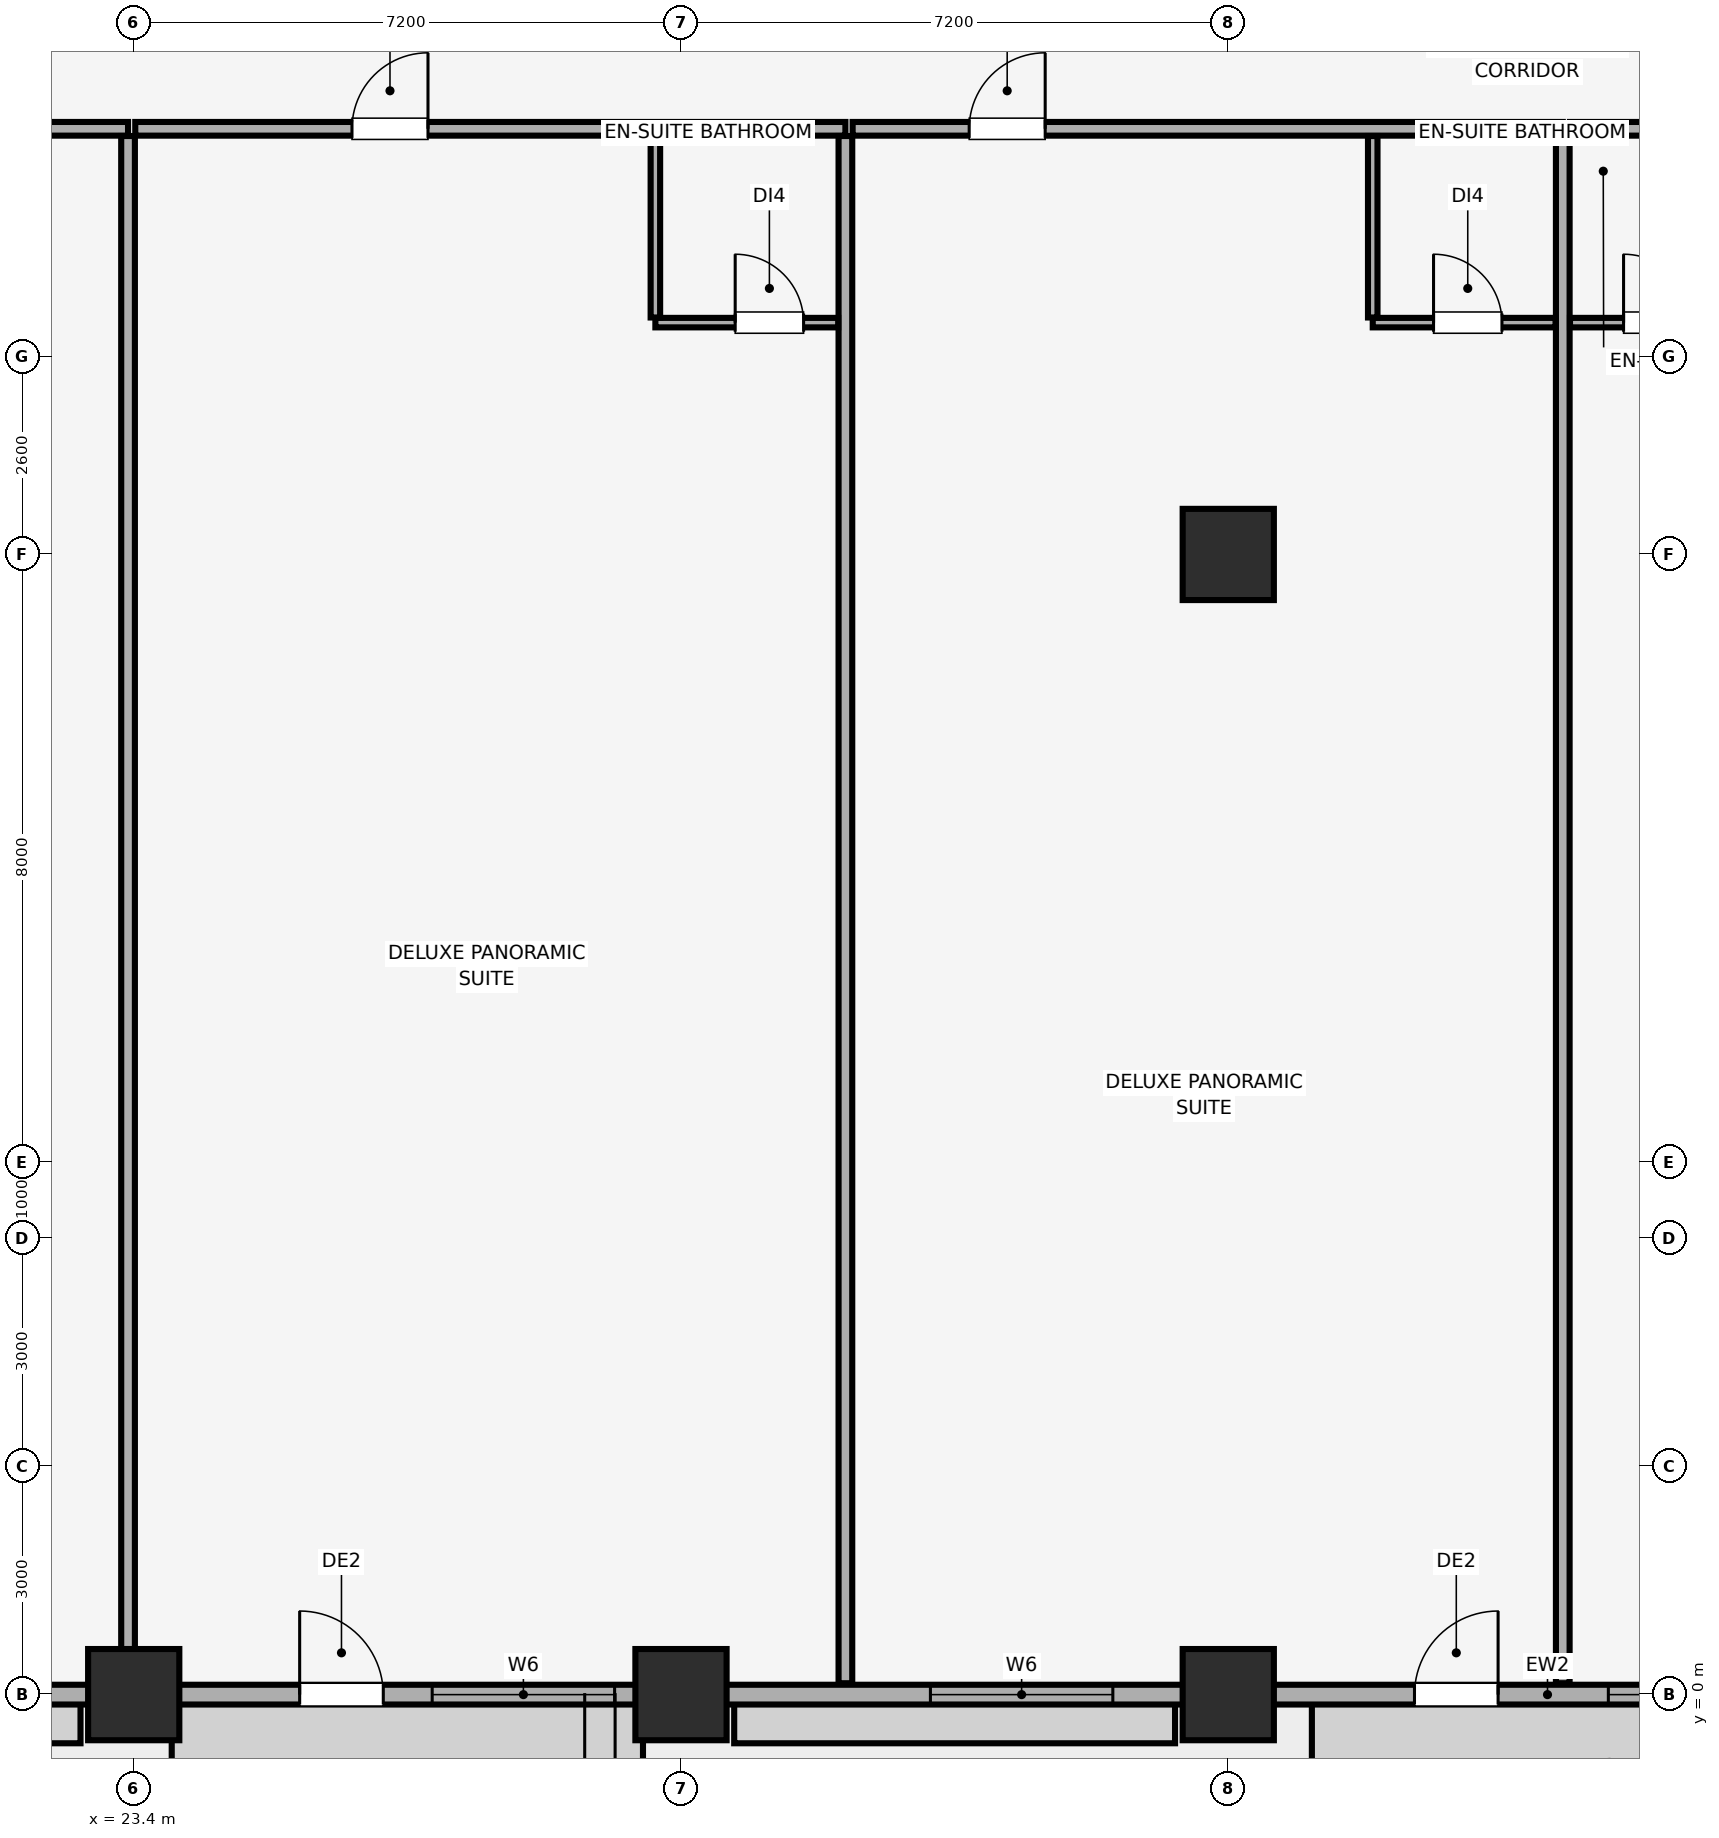
"""IFC4 building model, lengths in metres.
Left out: names, types, materials, properties, quantities, classifications, styles, units other than length and angle.
Written with IfcOpenShell. Run it as: python <this file> out.ifc"""

import sys

from ifc_helpers import new_model, si_unit, direction, frame, frame_2d, origin, origin_2d, place, context, subcontext, project, spatial, rectangle, extrude, element, fill, save


model = new_model("IFC4")
c1 = context("Model", 3, precision=1e-05, world=origin(), true_north=direction((0.0, 1.0)))
c2 = subcontext(c1, "Body", "Model", "MODEL_VIEW")
j1 = project(units=[si_unit("LENGTHUNIT", "METRE"), si_unit("PLANEANGLEUNIT", "RADIAN")], contexts=[c1])
p1 = place(None, origin())
s1 = spatial("IfcSite", under=j1, at=p1, CompositionType="ELEMENT")
p2 = place(p1, origin())
s2 = spatial("IfcBuilding", under=s1, at=p2, CompositionType="ELEMENT")
p3 = place(p2, frame((0.0, 0.0, 93.05)))
s3 = spatial("IfcBuildingStorey", under=s2, at=p3, CompositionType="ELEMENT", Elevation=93.05)
for number, where, z_axis, x_axis in (
    (1, (23.4, 0.0, 0.0), (0.0, 0.0, 1.0), (1.0, 0.0, 0.0)),
    (2, (30.6, 0.0, 0.0), (0.0, 0.0, 1.0), (1.0, 0.0, 0.0)),
    (3, (37.8, 0.0, 0.0), (0.0, 0.0, 1.0), (1.0, 0.0, 0.0)),
    (4, (37.8, 15.0, 0.0), (0.0, 0.0, 1.0), (1.0, 0.0, 0.0)),
):
    element("IfcColumn", number, at=place(p3, frame(where, z_axis=z_axis, x_axis=x_axis)), inside=s3, PredefinedType="COLUMN", context=c2, shape_type="SweptSolid", body=[
        extrude(rectangle(XDim=1.2, YDim=1.2, at=origin_2d()), origin(), (0.0, 0.0, 1.0), 3.51),
    ])
p4 = place(p3, frame((4.2, 0.0, 0.0), z_axis=(0.0, 0.0, 1.0), x_axis=(1.0, 0.0, 0.0)))
e5 = element("IfcWall", 5, at=p4, inside=s3, PredefinedType="SOLIDWALL", context=c2, shape_type="SweptSolid", body=[
    extrude(rectangle(XDim=75.6, YDim=0.26, at=frame_2d((37.8, 0.0))), origin(), (0.0, 0.0, 1.0), 2.56),
])
p5 = place(p4, frame((21.383, 0.0, 0.0)))
e6 = element("IfcOpeningElement", 6, at=p5, cuts=e5, PredefinedType="OPENING", context=c2, shape_type="SweptSolid", body=[
    extrude(rectangle(XDim=1.1, YDim=2.15, at=frame_2d((0.55, 1.075))), frame((0.0, 0.14, 0.0), z_axis=(0.0, -1.0, 0.0), x_axis=(1.0, 0.0, 0.0)), (0.0, 0.0, 1.0), 0.28),
])
p6 = place(p4, frame((36.05, 0.0, 0.0)))
e7 = element("IfcOpeningElement", 7, at=p6, cuts=e5, PredefinedType="OPENING", context=c2, shape_type="SweptSolid", body=[
    extrude(rectangle(XDim=1.1, YDim=2.15, at=frame_2d((0.55, 1.075))), frame((0.0, 0.14, 0.0), z_axis=(0.0, -1.0, 0.0), x_axis=(1.0, 0.0, 0.0)), (0.0, 0.0, 1.0), 0.28),
])
p7 = place(p4, frame((53.117, 0.0, 0.0)))
e8 = element("IfcOpeningElement", 8, at=p7, cuts=e5, PredefinedType="OPENING", context=c2, shape_type="SweptSolid", body=[
    extrude(rectangle(XDim=1.1, YDim=2.15, at=frame_2d((0.55, 1.075))), frame((0.0, 0.14, 0.0), z_axis=(0.0, -1.0, 0.0), x_axis=(1.0, 0.0, 0.0)), (0.0, 0.0, 1.0), 0.28),
])
p8 = place(p4, frame((1.035, 0.0, 0.85)))
e9 = element("IfcOpeningElement", 9, at=p8, cuts=e5, PredefinedType="OPENING", context=c2, shape_type="SweptSolid", body=[
    extrude(rectangle(XDim=2.4, YDim=1.5, at=frame_2d((1.2, 0.75))), frame((0.0, 0.14, 0.0), z_axis=(0.0, -1.0, 0.0), x_axis=(1.0, 0.0, 0.0)), (0.0, 0.0, 1.0), 0.28),
])
p9 = place(p4, frame((6.244, 0.0, 0.85)))
e10 = element("IfcOpeningElement", 10, at=p9, cuts=e5, PredefinedType="OPENING", context=c2, shape_type="SweptSolid", body=[
    extrude(rectangle(XDim=2.4, YDim=1.5, at=frame_2d((1.2, 0.75))), frame((0.0, 0.14, 0.0), z_axis=(0.0, -1.0, 0.0), x_axis=(1.0, 0.0, 0.0)), (0.0, 0.0, 1.0), 0.28),
])
p10 = place(p4, frame((14.4, 0.0, 0.85)))
e11 = element("IfcOpeningElement", 11, at=p10, cuts=e5, PredefinedType="OPENING", context=c2, shape_type="SweptSolid", body=[
    extrude(rectangle(XDim=2.4, YDim=1.5, at=frame_2d((1.2, 0.75))), frame((0.0, 0.14, 0.0), z_axis=(0.0, -1.0, 0.0), x_axis=(1.0, 0.0, 0.0)), (0.0, 0.0, 1.0), 0.28),
])
p11 = place(p4, frame((23.127, 0.0, 0.85)))
e12 = element("IfcOpeningElement", 12, at=p11, cuts=e5, PredefinedType="OPENING", context=c2, shape_type="SweptSolid", body=[
    extrude(rectangle(XDim=2.4, YDim=1.5, at=frame_2d((1.2, 0.75))), frame((0.0, 0.14, 0.0), z_axis=(0.0, -1.0, 0.0), x_axis=(1.0, 0.0, 0.0)), (0.0, 0.0, 1.0), 0.28),
])
p12 = place(p4, frame((29.681, 0.0, 0.85)))
e13 = element("IfcOpeningElement", 13, at=p12, cuts=e5, PredefinedType="OPENING", context=c2, shape_type="SweptSolid", body=[
    extrude(rectangle(XDim=2.4, YDim=1.5, at=frame_2d((1.2, 0.75))), frame((0.0, 0.14, 0.0), z_axis=(0.0, -1.0, 0.0), x_axis=(1.0, 0.0, 0.0)), (0.0, 0.0, 1.0), 0.28),
])
p13 = place(p4, frame((38.601, 0.0, 0.85)))
e14 = element("IfcOpeningElement", 14, at=p13, cuts=e5, PredefinedType="OPENING", context=c2, shape_type="SweptSolid", body=[
    extrude(rectangle(XDim=2.4, YDim=1.5, at=frame_2d((1.2, 0.75))), frame((0.0, 0.14, 0.0), z_axis=(0.0, -1.0, 0.0), x_axis=(1.0, 0.0, 0.0)), (0.0, 0.0, 1.0), 0.28),
])
p14 = place(p4, frame((43.719, 0.0, 0.85)))
e15 = element("IfcOpeningElement", 15, at=p14, cuts=e5, PredefinedType="OPENING", context=c2, shape_type="SweptSolid", body=[
    extrude(rectangle(XDim=2.4, YDim=1.5, at=frame_2d((1.2, 0.75))), frame((0.0, 0.14, 0.0), z_axis=(0.0, -1.0, 0.0), x_axis=(1.0, 0.0, 0.0)), (0.0, 0.0, 1.0), 0.28),
])
p15 = place(p4, frame((50.073, 0.0, 0.85)))
e16 = element("IfcOpeningElement", 16, at=p15, cuts=e5, PredefinedType="OPENING", context=c2, shape_type="SweptSolid", body=[
    extrude(rectangle(XDim=2.4, YDim=1.5, at=frame_2d((1.2, 0.75))), frame((0.0, 0.14, 0.0), z_axis=(0.0, -1.0, 0.0), x_axis=(1.0, 0.0, 0.0)), (0.0, 0.0, 1.0), 0.28),
])
p16 = place(p4, frame((58.838, 0.0, 0.85)))
e17 = element("IfcOpeningElement", 17, at=p16, cuts=e5, PredefinedType="OPENING", context=c2, shape_type="SweptSolid", body=[
    extrude(rectangle(XDim=2.4, YDim=1.5, at=frame_2d((1.2, 0.75))), frame((0.0, 0.14, 0.0), z_axis=(0.0, -1.0, 0.0), x_axis=(1.0, 0.0, 0.0)), (0.0, 0.0, 1.0), 0.28),
])
p17 = place(p4, frame((67.056, 0.0, 0.85)))
e18 = element("IfcOpeningElement", 18, at=p17, cuts=e5, PredefinedType="OPENING", context=c2, shape_type="SweptSolid", body=[
    extrude(rectangle(XDim=2.4, YDim=1.5, at=frame_2d((1.2, 0.75))), frame((0.0, 0.14, 0.0), z_axis=(0.0, -1.0, 0.0), x_axis=(1.0, 0.0, 0.0)), (0.0, 0.0, 1.0), 0.28),
])
p18 = place(p4, frame((72.165, 0.0, 0.85)))
e19 = element("IfcOpeningElement", 19, at=p18, cuts=e5, PredefinedType="OPENING", context=c2, shape_type="SweptSolid", body=[
    extrude(rectangle(XDim=2.4, YDim=1.5, at=frame_2d((1.2, 0.75))), frame((0.0, 0.14, 0.0), z_axis=(0.0, -1.0, 0.0), x_axis=(1.0, 0.0, 0.0)), (0.0, 0.0, 1.0), 0.28),
])
p19 = place(p3, frame((13.983, 20.6, 0.0), z_axis=(0.0, 0.0, 1.0), x_axis=(1.0, 0.0, 0.0)))
e20 = element("IfcWall", 20, at=p19, inside=s3, PredefinedType="PARTITIONING", context=c2, shape_type="SweptSolid", body=[
    extrude(rectangle(XDim=9.343, YDim=0.18, at=frame_2d((4.671, 0.0))), origin(), (0.0, 0.0, 1.0), 3.51),
])
p20 = place(p19, frame((5.471, 0.0, 0.0)))
e21 = element("IfcOpeningElement", 21, at=p20, cuts=e20, PredefinedType="OPENING", context=c2, shape_type="SweptSolid", body=[
    extrude(rectangle(XDim=1.0, YDim=2.15, at=frame_2d((0.5, 1.075))), frame((0.0, 0.1, 0.0), z_axis=(0.0, -1.0, 0.0), x_axis=(1.0, 0.0, 0.0)), (0.0, 0.0, 1.0), 0.2),
])
p21 = place(p3, frame((23.325, 0.15, 0.0), z_axis=(0.0, 0.0, 1.0), x_axis=(0.0, 1.0, 0.0)))
e22 = element("IfcWall", 22, at=p21, inside=s3, PredefinedType="PARTITIONING", context=c2, shape_type="SweptSolid", body=[
    extrude(rectangle(XDim=20.355, YDim=0.18, at=frame_2d((10.177, 0.0))), origin(), (0.0, 0.0, 1.0), 2.898),
])
p22 = place(p3, frame((23.42, 20.6, 0.0), z_axis=(0.0, 0.0, 1.0), x_axis=(1.0, 0.0, 0.0)))
e23 = element("IfcWall", 23, at=p22, inside=s3, PredefinedType="PARTITIONING", context=c2, shape_type="SweptSolid", body=[
    extrude(rectangle(XDim=9.343, YDim=0.18, at=frame_2d((4.671, 0.0))), origin(), (0.0, 0.0, 1.0), 3.51),
])
p23 = place(p22, frame((2.851, 0.0, 0.0)))
e24 = element("IfcOpeningElement", 24, at=p23, cuts=e23, PredefinedType="OPENING", context=c2, shape_type="SweptSolid", body=[
    extrude(rectangle(XDim=1.0, YDim=2.15, at=frame_2d((0.5, 1.075))), frame((0.0, 0.1, 0.0), z_axis=(0.0, -1.0, 0.0), x_axis=(1.0, 0.0, 0.0)), (0.0, 0.0, 1.0), 0.2),
])
p24 = place(p3, frame((32.763, 0.15, 0.0), z_axis=(0.0, 0.0, 1.0), x_axis=(0.0, 1.0, 0.0)))
e25 = element("IfcWall", 25, at=p24, inside=s3, PredefinedType="PARTITIONING", context=c2, shape_type="SweptSolid", body=[
    extrude(rectangle(XDim=20.355, YDim=0.18, at=frame_2d((10.177, 0.0))), origin(), (0.0, 0.0, 1.0), 3.51),
])
p25 = place(p3, frame((30.263, 18.05, 0.0), z_axis=(0.0, 0.0, 1.0), x_axis=(1.0, 0.0, 0.0)))
e26 = element("IfcWall", 26, at=p25, inside=s3, PredefinedType="PARTITIONING", context=c2, shape_type="SweptSolid", body=[
    extrude(rectangle(XDim=2.405, YDim=0.125, at=frame_2d((1.203, 0.0))), origin(), (0.0, 0.0, 1.0), 3.51),
])
p26 = place(p25, frame((1.05, 0.0, 0.0)))
e27 = element("IfcOpeningElement", 27, at=p26, cuts=e26, PredefinedType="OPENING", context=c2, shape_type="SweptSolid", body=[
    extrude(rectangle(XDim=0.9, YDim=2.1, at=frame_2d((0.45, 1.05))), frame((0.0, 0.073, 0.0), z_axis=(0.0, -1.0, 0.0), x_axis=(1.0, 0.0, 0.0)), (0.0, 0.0, 1.0), 0.145),
])
p27 = place(p3, frame((30.263, 18.117, 0.0), z_axis=(0.0, 0.0, 1.0), x_axis=(0.0, 1.0, 0.0)))
e28 = element("IfcWall", 28, at=p27, inside=s3, PredefinedType="PARTITIONING", context=c2, shape_type="SweptSolid", body=[
    extrude(rectangle(XDim=2.387, YDim=0.125, at=frame_2d((1.194, 0.0))), origin(), (0.0, 0.0, 1.0), 3.51),
])
p28 = place(p3, frame((32.858, 20.6, 0.0), z_axis=(0.0, 0.0, 1.0), x_axis=(1.0, 0.0, 0.0)))
e29 = element("IfcWall", 29, at=p28, inside=s3, PredefinedType="PARTITIONING", context=c2, shape_type="SweptSolid", body=[
    extrude(rectangle(XDim=9.343, YDim=0.18, at=frame_2d((4.671, 0.0))), origin(), (0.0, 0.0, 1.0), 3.51),
])
p29 = place(p28, frame((1.533, 0.0, 0.0)))
e30 = element("IfcOpeningElement", 30, at=p29, cuts=e29, PredefinedType="OPENING", context=c2, shape_type="SweptSolid", body=[
    extrude(rectangle(XDim=1.0, YDim=2.15, at=frame_2d((0.5, 1.075))), frame((0.0, 0.1, 0.0), z_axis=(0.0, -1.0, 0.0), x_axis=(1.0, 0.0, 0.0)), (0.0, 0.0, 1.0), 0.2),
])
p30 = place(p3, frame((42.201, 0.15, 0.0), z_axis=(0.0, 0.0, 1.0), x_axis=(0.0, 1.0, 0.0)))
e31 = element("IfcWall", 31, at=p30, inside=s3, PredefinedType="PARTITIONING", context=c2, shape_type="SweptSolid", body=[
    extrude(rectangle(XDim=20.355, YDim=0.18, at=frame_2d((10.177, 0.0))), origin(), (0.0, 0.0, 1.0), 2.898),
])
p31 = place(p3, frame((39.701, 18.05, 0.0), z_axis=(0.0, 0.0, 1.0), x_axis=(1.0, 0.0, 0.0)))
e32 = element("IfcWall", 32, at=p31, inside=s3, PredefinedType="PARTITIONING", context=c2, shape_type="SweptSolid", body=[
    extrude(rectangle(XDim=2.405, YDim=0.125, at=frame_2d((1.203, 0.0))), origin(), (0.0, 0.0, 1.0), 3.51),
])
p32 = place(p31, frame((0.8, 0.0, 0.0)))
e33 = element("IfcOpeningElement", 33, at=p32, cuts=e32, PredefinedType="OPENING", context=c2, shape_type="SweptSolid", body=[
    extrude(rectangle(XDim=0.9, YDim=2.1, at=frame_2d((0.45, 1.05))), frame((0.0, 0.073, 0.0), z_axis=(0.0, -1.0, 0.0), x_axis=(1.0, 0.0, 0.0)), (0.0, 0.0, 1.0), 0.145),
])
p33 = place(p3, frame((39.701, 18.117, 0.0), z_axis=(0.0, 0.0, 1.0), x_axis=(0.0, 1.0, 0.0)))
e34 = element("IfcWall", 34, at=p33, inside=s3, PredefinedType="PARTITIONING", context=c2, shape_type="SweptSolid", body=[
    extrude(rectangle(XDim=2.387, YDim=0.125, at=frame_2d((1.194, 0.0))), origin(), (0.0, 0.0, 1.0), 3.51),
])
p34 = place(p3, frame((42.296, 20.6, 0.0), z_axis=(0.0, 0.0, 1.0), x_axis=(1.0, 0.0, 0.0)))
e35 = element("IfcWall", 35, at=p34, inside=s3, PredefinedType="PARTITIONING", context=c2, shape_type="SweptSolid", body=[
    extrude(rectangle(XDim=9.343, YDim=0.18, at=frame_2d((4.671, 0.0))), origin(), (0.0, 0.0, 1.0), 3.51),
])
p35 = place(p34, frame((6.513, 0.0, 0.0)))
e36 = element("IfcOpeningElement", 36, at=p35, cuts=e35, PredefinedType="OPENING", context=c2, shape_type="SweptSolid", body=[
    extrude(rectangle(XDim=1.0, YDim=2.15, at=frame_2d((0.5, 1.075))), frame((0.0, 0.1, 0.0), z_axis=(0.0, -1.0, 0.0), x_axis=(1.0, 0.0, 0.0)), (0.0, 0.0, 1.0), 0.2),
])
p36 = place(p3, frame((42.296, 18.05, 0.0), z_axis=(0.0, 0.0, 1.0), x_axis=(1.0, 0.0, 0.0)))
e37 = element("IfcWall", 37, at=p36, inside=s3, PredefinedType="PARTITIONING", context=c2, shape_type="SweptSolid", body=[
    extrude(rectangle(XDim=2.405, YDim=0.125, at=frame_2d((1.202, 0.0))), origin(), (0.0, 0.0, 1.0), 3.51),
])
p37 = place(p36, frame((0.705, 0.0, 0.0)))
e38 = element("IfcOpeningElement", 38, at=p37, cuts=e37, PredefinedType="OPENING", context=c2, shape_type="SweptSolid", body=[
    extrude(rectangle(XDim=0.9, YDim=2.1, at=frame_2d((0.45, 1.05))), frame((0.0, 0.073, 0.0), z_axis=(0.0, -1.0, 0.0), x_axis=(1.0, 0.0, 0.0)), (0.0, 0.0, 1.0), 0.145),
])
p38 = place(p5, origin())
e39 = element("IfcDoor", 39, at=p38, inside=s3, OperationType="SINGLE_SWING_LEFT", PredefinedType="DOOR", context=c2, shape_type="SweptSolid", body=[
    extrude(rectangle(XDim=1.1, YDim=2.15, at=frame_2d((0.55, 1.075))), frame((0.0, 0.025, 0.0), z_axis=(0.0, -1.0, 0.0), x_axis=(1.0, 0.0, 0.0)), (0.0, 0.0, 1.0), 0.05),
])
fill(e6, e39)
p39 = place(p6, origin())
e40 = element("IfcDoor", 40, at=p39, inside=s3, OperationType="SINGLE_SWING_RIGHT", PredefinedType="DOOR", context=c2, shape_type="SweptSolid", body=[
    extrude(rectangle(XDim=1.1, YDim=2.15, at=frame_2d((0.55, 1.075))), frame((0.0, 0.025, 0.0), z_axis=(0.0, -1.0, 0.0), x_axis=(1.0, 0.0, 0.0)), (0.0, 0.0, 1.0), 0.05),
])
fill(e7, e40)
p40 = place(p11, origin())
e41 = element("IfcWindow", 41, at=p40, inside=s3, PartitioningType="SINGLE_PANEL", PredefinedType="WINDOW", context=c2, shape_type="SweptSolid", body=[
    extrude(rectangle(XDim=2.4, YDim=1.5, at=frame_2d((1.2, 0.75))), frame((0.0, 0.03, 0.0), z_axis=(0.0, -1.0, 0.0), x_axis=(1.0, 0.0, 0.0)), (0.0, 0.0, 1.0), 0.06),
])
fill(e12, e41)
p41 = place(p12, origin())
e42 = element("IfcWindow", 42, at=p41, inside=s3, PartitioningType="SINGLE_PANEL", PredefinedType="WINDOW", context=c2, shape_type="SweptSolid", body=[
    extrude(rectangle(XDim=2.4, YDim=1.5, at=frame_2d((1.2, 0.75))), frame((0.0, 0.03, 0.0), z_axis=(0.0, -1.0, 0.0), x_axis=(1.0, 0.0, 0.0)), (0.0, 0.0, 1.0), 0.06),
])
fill(e13, e42)
p42 = place(p13, origin())
e43 = element("IfcWindow", 43, at=p42, inside=s3, PartitioningType="SINGLE_PANEL", PredefinedType="WINDOW", context=c2, shape_type="SweptSolid", body=[
    extrude(rectangle(XDim=2.4, YDim=1.5, at=frame_2d((1.2, 0.75))), frame((0.0, 0.03, 0.0), z_axis=(0.0, -1.0, 0.0), x_axis=(1.0, 0.0, 0.0)), (0.0, 0.0, 1.0), 0.06),
])
fill(e14, e43)
p43 = place(p23, origin())
e44 = element("IfcDoor", 44, at=p43, inside=s3, OperationType="SINGLE_SWING_RIGHT", PredefinedType="DOOR", context=c2, shape_type="SweptSolid", body=[
    extrude(rectangle(XDim=1.0, YDim=2.15, at=frame_2d((0.5, 1.075))), frame((0.0, 0.025, 0.0), z_axis=(0.0, -1.0, 0.0), x_axis=(1.0, 0.0, 0.0)), (0.0, 0.0, 1.0), 0.05),
])
fill(e24, e44)
p44 = place(p26, origin())
e45 = element("IfcDoor", 45, at=p44, inside=s3, OperationType="SINGLE_SWING_LEFT", PredefinedType="DOOR", context=c2, shape_type="SweptSolid", body=[
    extrude(rectangle(XDim=0.9, YDim=2.1, at=frame_2d((0.45, 1.05))), frame((0.0, 0.025, 0.0), z_axis=(0.0, -1.0, 0.0), x_axis=(1.0, 0.0, 0.0)), (0.0, 0.0, 1.0), 0.05),
])
fill(e27, e45)
p45 = place(p29, origin())
e46 = element("IfcDoor", 46, at=p45, inside=s3, OperationType="SINGLE_SWING_RIGHT", PredefinedType="DOOR", context=c2, shape_type="SweptSolid", body=[
    extrude(rectangle(XDim=1.0, YDim=2.15, at=frame_2d((0.5, 1.075))), frame((0.0, 0.025, 0.0), z_axis=(0.0, -1.0, 0.0), x_axis=(1.0, 0.0, 0.0)), (0.0, 0.0, 1.0), 0.05),
])
fill(e30, e46)
p46 = place(p32, origin())
e47 = element("IfcDoor", 47, at=p46, inside=s3, OperationType="SINGLE_SWING_LEFT", PredefinedType="DOOR", context=c2, shape_type="SweptSolid", body=[
    extrude(rectangle(XDim=0.9, YDim=2.1, at=frame_2d((0.45, 1.05))), frame((0.0, 0.025, 0.0), z_axis=(0.0, -1.0, 0.0), x_axis=(1.0, 0.0, 0.0)), (0.0, 0.0, 1.0), 0.05),
])
fill(e33, e47)
p47 = place(p37, origin())
e48 = element("IfcDoor", 48, at=p47, inside=s3, OperationType="SINGLE_SWING_LEFT", PredefinedType="DOOR", context=c2, shape_type="SweptSolid", body=[
    extrude(rectangle(XDim=0.9, YDim=2.1, at=frame_2d((0.45, 1.05))), frame((0.0, 0.025, 0.0), z_axis=(0.0, -1.0, 0.0), x_axis=(1.0, 0.0, 0.0)), (0.0, 0.0, 1.0), 0.05),
])
fill(e38, e48)
save(model, sys.argv[1])
